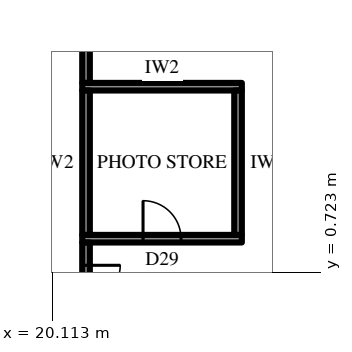
"""IFC4 building model, lengths in metres.
Left out: names, types, materials, properties, quantities, classifications, styles, units other than length and angle.
Written with IfcOpenShell. Run it as: python <this file> out.ifc"""

import sys

from ifc_helpers import new_model, si_unit, direction, frame, frame_2d, origin, place, context, subcontext, project, spatial, rectangle, extrude, element, fill, save


model = new_model("IFC4")
c1 = context("Model", 3, precision=1e-05, world=origin(), true_north=direction((0.0, 1.0)))
c2 = subcontext(c1, "Body", "Model", "MODEL_VIEW")
j1 = project(units=[si_unit("LENGTHUNIT", "METRE"), si_unit("PLANEANGLEUNIT", "RADIAN")], contexts=[c1])
p1 = place(None, origin())
s1 = spatial("IfcSite", under=j1, at=p1, CompositionType="ELEMENT")
p2 = place(p1, origin())
s2 = spatial("IfcBuilding", under=s1, at=p2, CompositionType="ELEMENT")
p3 = place(p2, frame((0.0, 0.0, 99.1)))
s3 = spatial("IfcBuildingStorey", under=s2, at=p3, CompositionType="ELEMENT", Elevation=99.1)
p4 = place(p3, frame((20.9, 1.6, 0.0), z_axis=(0.0, 0.0, 1.0), x_axis=(1.0, 0.0, 0.0)))
e1 = element("IfcWall", 1, at=p4, inside=s3, PredefinedType="PARTITIONING", context=c2, shape_type="SweptSolid", body=[
    extrude(rectangle(XDim=4.2, YDim=0.2, at=frame_2d((2.1, 0.0))), origin(), (0.0, 0.0, 1.0), 4.0),
])
p5 = place(p4, frame((1.6, 0.0, 0.0)))
e2 = element("IfcOpeningElement", 2, at=p5, cuts=e1, PredefinedType="OPENING", context=c2, shape_type="SweptSolid", body=[
    extrude(rectangle(XDim=1.0, YDim=2.2, at=frame_2d((0.5, 1.1))), frame((0.0, 0.11, 0.0), z_axis=(0.0, -1.0, 0.0), x_axis=(1.0, 0.0, 0.0)), (0.0, 0.0, 1.0), 0.22),
])
p6 = place(p3, frame((20.9, 5.6, 0.0), z_axis=(0.0, 0.0, 1.0), x_axis=(1.0, 0.0, 0.0)))
e3 = element("IfcWall", 3, at=p6, inside=s3, PredefinedType="PARTITIONING", context=c2, shape_type="SweptSolid", body=[
    extrude(rectangle(XDim=4.2, YDim=0.2, at=frame_2d((2.1, 0.0))), origin(), (0.0, 0.0, 1.0), 4.0),
])
for number, where, z_axis, x_axis in (
    (4, (21.0, 1.7, 0.0), (0.0, 0.0, 1.0), (0.0, 1.0, 0.0)),
    (5, (25.0, 1.7, 0.0), (0.0, 0.0, 1.0), (0.0, 1.0, 0.0)),
):
    element("IfcWall", number, at=place(p3, frame(where, z_axis=z_axis, x_axis=x_axis)), inside=s3, PredefinedType="PARTITIONING", context=c2, shape_type="SweptSolid", body=[
        extrude(rectangle(XDim=3.8, YDim=0.2, at=frame_2d((1.9, 0.0))), origin(), (0.0, 0.0, 1.0), 4.0),
    ])
p7 = place(p3, frame((21.0, 1.499, 0.0), z_axis=(0.0, 0.0, 1.0), x_axis=(0.0, -1.0, 0.0)))
e6 = element("IfcWall", 6, at=p7, inside=s3, PredefinedType="PARTITIONING", context=c2, shape_type="SweptSolid", body=[
    extrude(rectangle(XDim=14.199, YDim=0.2, at=frame_2d((7.1, 0.0))), origin(), (0.0, 0.0, 1.0), 4.0),
])
p8 = place(p7, frame((0.599, 0.0, 0.0)))
e7 = element("IfcOpeningElement", 7, at=p8, cuts=e6, PredefinedType="OPENING", context=c2, shape_type="SweptSolid", body=[
    extrude(rectangle(XDim=1.8, YDim=2.4, at=frame_2d((0.9, 1.2))), frame((0.0, 0.11, 0.0), z_axis=(0.0, -1.0, 0.0), x_axis=(1.0, 0.0, 0.0)), (0.0, 0.0, 1.0), 0.22),
])
p9 = place(p3, frame((21.0, 12.7, 0.0), z_axis=(0.0, 0.0, 1.0), x_axis=(0.0, -1.0, 0.0)))
e8 = element("IfcWall", 8, at=p9, inside=s3, PredefinedType="PARTITIONING", context=c2, shape_type="SweptSolid", body=[
    extrude(rectangle(XDim=6.999, YDim=0.2, at=frame_2d((3.5, 0.0))), origin(), (0.0, 0.0, 1.0), 4.0),
])
p10 = place(p5, origin())
e9 = element("IfcDoor", 9, at=p10, inside=s3, OperationType="SINGLE_SWING_RIGHT", PredefinedType="DOOR", context=c2, shape_type="SweptSolid", body=[
    extrude(rectangle(XDim=1.0, YDim=2.2, at=frame_2d((0.5, 1.1))), frame((0.0, 0.025, 0.0), z_axis=(0.0, -1.0, 0.0), x_axis=(1.0, 0.0, 0.0)), (0.0, 0.0, 1.0), 0.05),
])
fill(e2, e9)
p11 = place(p8, origin())
e10 = element("IfcDoor", 10, at=p11, inside=s3, OperationType="DOUBLE_DOOR_SINGLE_SWING", PredefinedType="DOOR", context=c2, shape_type="SweptSolid", body=[
    extrude(rectangle(XDim=1.8, YDim=2.4, at=frame_2d((0.9, 1.2))), frame((0.0, 0.025, 0.0), z_axis=(0.0, -1.0, 0.0), x_axis=(1.0, 0.0, 0.0)), (0.0, 0.0, 1.0), 0.05),
])
fill(e7, e10)
save(model, sys.argv[1])
